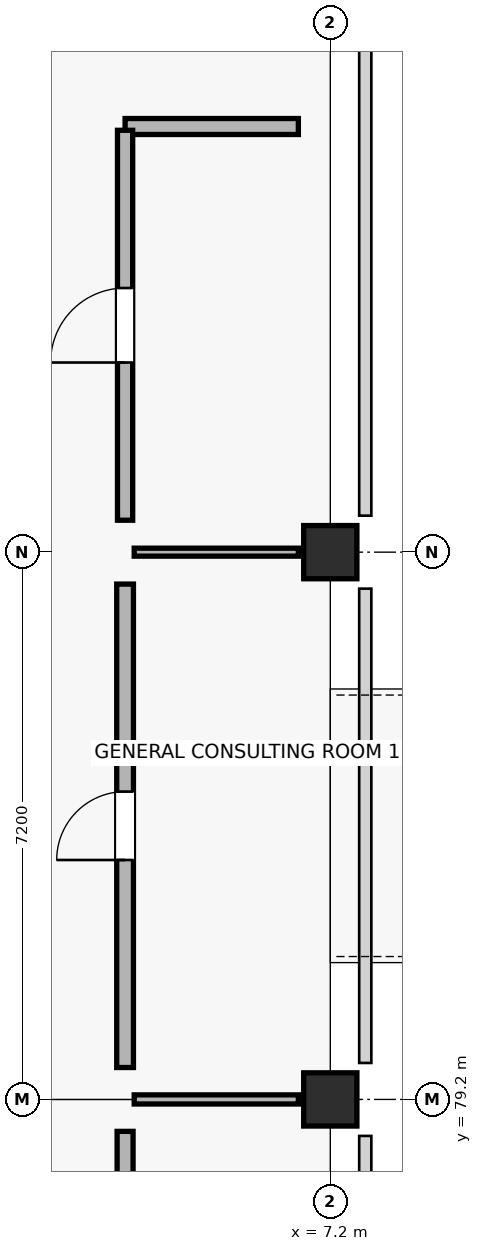
"""IFC4 building model, lengths in metres.
Left out: names, types, materials, properties, quantities, classifications, styles, units other than length and angle.
Written with IfcOpenShell. Run it as: python <this file> out.ifc"""

import sys

from ifc_helpers import new_model, si_unit, direction, frame, frame_2d, origin, origin_2d, place, context, subcontext, project, spatial, rectangle, extrude, element, fill, save


model = new_model("IFC4")
c1 = context("Model", 3, precision=1e-05, world=origin(), true_north=direction((0.0, 1.0)))
c2 = subcontext(c1, "Body", "Model", "MODEL_VIEW")
j1 = project(units=[si_unit("LENGTHUNIT", "METRE"), si_unit("PLANEANGLEUNIT", "RADIAN")], contexts=[c1])
p1 = place(None, origin())
s1 = spatial("IfcSite", under=j1, at=p1, CompositionType="ELEMENT")
p2 = place(p1, origin())
s2 = spatial("IfcBuilding", under=s1, at=p2, CompositionType="ELEMENT")
p3 = place(p2, frame((0.0, 0.0, 4.5)))
s3 = spatial("IfcBuildingStorey", under=s2, at=p3, CompositionType="ELEMENT", Elevation=4.5)
for number, where, z_axis, x_axis in (
    (1, (7.2, 79.2, 0.0), (0.0, 0.0, 1.0), (1.0, 0.0, 0.0)),
    (2, (7.2, 86.4, 0.0), (0.0, 0.0, 1.0), (1.0, 0.0, 0.0)),
):
    element("IfcColumn", number, at=place(p3, frame(where, z_axis=z_axis, x_axis=x_axis)), inside=s3, PredefinedType="COLUMN", context=c2, shape_type="SweptSolid", body=[
        extrude(rectangle(XDim=0.7, YDim=0.7, at=origin_2d()), origin(), (0.0, 0.0, 1.0), 4.5),
    ])
p4 = place(p3, frame((4.5, 72.42, 0.0), z_axis=(0.0, 0.0, 1.0), x_axis=(0.0, 1.0, 0.0)))
e3 = element("IfcWall", 3, at=p4, inside=s3, PredefinedType="PLUMBINGWALL", context=c2, shape_type="SweptSolid", body=[
    extrude(rectangle(XDim=6.36, YDim=0.21, at=frame_2d((3.18, 0.0))), origin(), (0.0, 0.0, 1.0), 3.36),
])
p5 = place(p4, frame((2.45, 0.0, 0.0)))
e4 = element("IfcOpeningElement", 4, at=p5, cuts=e3, PredefinedType="OPENING", context=c2, shape_type="SweptSolid", body=[
    extrude(rectangle(XDim=1.46, YDim=2.14, at=frame_2d((0.73, 1.07))), frame((0.0, 0.115, 0.0), z_axis=(0.0, -1.0, 0.0), x_axis=(1.0, 0.0, 0.0)), (0.0, 0.0, 1.0), 0.23),
])
p6 = place(p3, frame((4.62, 79.2, 0.0), z_axis=(0.0, 0.0, 1.0), x_axis=(1.0, 0.0, 0.0)))
e5 = element("IfcWall", 5, at=p6, inside=s3, PredefinedType="PARTITIONING", context=c2, shape_type="SweptSolid", body=[
    extrude(rectangle(XDim=2.16, YDim=0.12, at=frame_2d((1.08, 0.0))), origin(), (0.0, 0.0, 1.0), 3.36),
])
p7 = place(p3, frame((4.5, 79.62, 0.0), z_axis=(0.0, 0.0, 1.0), x_axis=(0.0, 1.0, 0.0)))
e6 = element("IfcWall", 6, at=p7, inside=s3, PredefinedType="SOLIDWALL", context=c2, shape_type="SweptSolid", body=[
    extrude(rectangle(XDim=6.36, YDim=0.22, at=frame_2d((3.18, 0.0))), origin(), (0.0, 0.0, 1.0), 3.36),
])
p8 = place(p7, frame((2.73, 0.0, 0.0)))
e7 = element("IfcOpeningElement", 7, at=p8, cuts=e6, PredefinedType="OPENING", context=c2, shape_type="SweptSolid", body=[
    extrude(rectangle(XDim=0.9, YDim=2.19, at=frame_2d((0.45, 1.095))), frame((0.0, 0.12, 0.0), z_axis=(0.0, -1.0, 0.0), x_axis=(1.0, 0.0, 0.0)), (0.0, 0.0, 1.0), 0.24),
])
p9 = place(p3, frame((4.62, 86.4, 0.0), z_axis=(0.0, 0.0, 1.0), x_axis=(1.0, 0.0, 0.0)))
e8 = element("IfcWall", 8, at=p9, inside=s3, PredefinedType="PARTITIONING", context=c2, shape_type="SweptSolid", body=[
    extrude(rectangle(XDim=2.16, YDim=0.105, at=frame_2d((1.08, 0.0))), origin(), (0.0, 0.0, 1.0), 3.36),
])
p10 = place(p3, frame((4.5, 92.0, 0.0), z_axis=(0.0, 0.0, 1.0), x_axis=(1.0, 0.0, 0.0)))
e9 = element("IfcWall", 9, at=p10, inside=s3, PredefinedType="PLUMBINGWALL", context=c2, shape_type="SweptSolid", body=[
    extrude(rectangle(XDim=2.28, YDim=0.21, at=frame_2d((1.14, 0.0))), origin(), (0.0, 0.0, 1.0), 3.36),
])
p11 = place(p3, frame((4.5, 86.82, 0.0), z_axis=(0.0, 0.0, 1.0), x_axis=(0.0, 1.0, 0.0)))
e10 = element("IfcWall", 10, at=p11, inside=s3, PredefinedType="SOLIDWALL", context=c2, shape_type="SweptSolid", body=[
    extrude(rectangle(XDim=5.13, YDim=0.2, at=frame_2d((2.565, 0.0))), origin(), (0.0, 0.0, 1.0), 3.36),
])
p12 = place(p11, frame((2.075, 0.0, 0.0)))
e11 = element("IfcOpeningElement", 11, at=p12, cuts=e10, PredefinedType="OPENING", context=c2, shape_type="SweptSolid", body=[
    extrude(rectangle(XDim=0.98, YDim=2.19, at=frame_2d((0.49, 1.095))), frame((0.0, 0.11, 0.0), z_axis=(0.0, -1.0, 0.0), x_axis=(1.0, 0.0, 0.0)), (0.0, 0.0, 1.0), 0.22),
])
p13 = place(p8, origin())
e12 = element("IfcDoor", 12, at=p13, inside=s3, OperationType="SINGLE_SWING_LEFT", PredefinedType="DOOR", context=c2, shape_type="SweptSolid", body=[
    extrude(rectangle(XDim=0.9, YDim=2.19, at=frame_2d((0.45, 1.095))), frame((0.0, 0.025, 0.0), z_axis=(0.0, -1.0, 0.0), x_axis=(1.0, 0.0, 0.0)), (0.0, 0.0, 1.0), 0.05),
])
fill(e7, e12)
p14 = place(p12, origin())
e13 = element("IfcDoor", 13, at=p14, inside=s3, OperationType="SINGLE_SWING_LEFT", PredefinedType="DOOR", context=c2, shape_type="SweptSolid", body=[
    extrude(rectangle(XDim=0.98, YDim=2.19, at=frame_2d((0.49, 1.095))), frame((0.0, 0.025, 0.0), z_axis=(0.0, -1.0, 0.0), x_axis=(1.0, 0.0, 0.0)), (0.0, 0.0, 1.0), 0.05),
])
fill(e11, e13)
save(model, sys.argv[1])
